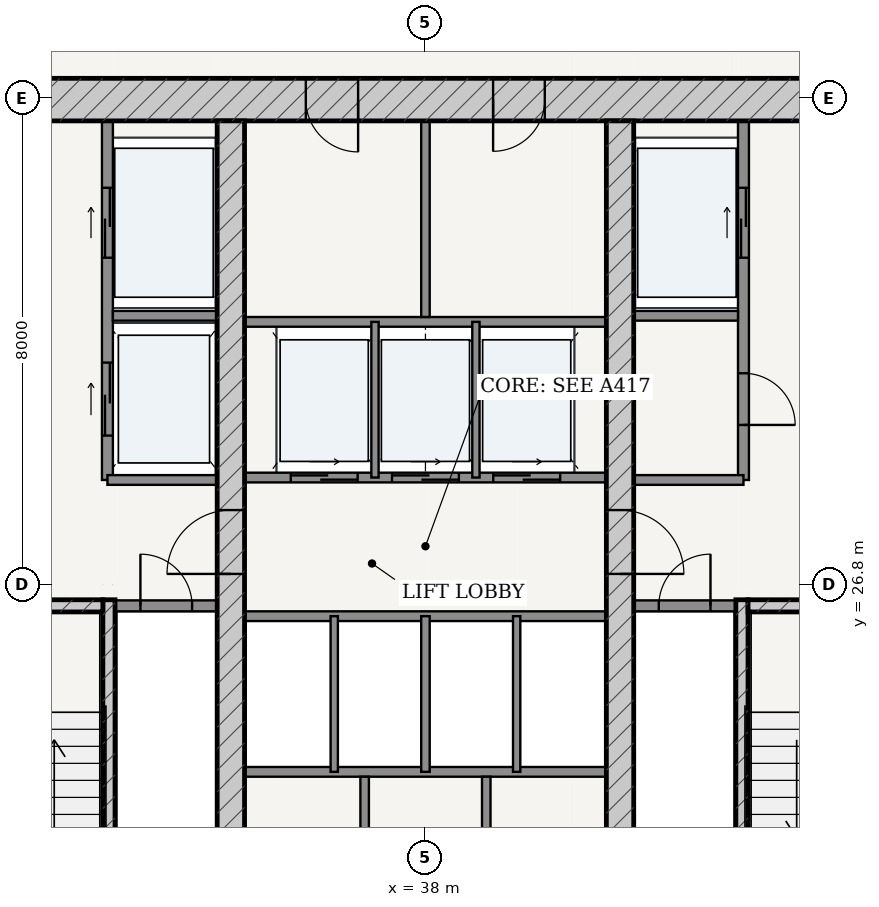
"""IFC4 building model, lengths in metres.
Left out: names, types, materials, properties, quantities, classifications, styles, units other than length and angle.
Written with IfcOpenShell. Run it as: python <this file> out.ifc"""

import sys

from ifc_helpers import new_model, si_unit, direction, frame, frame_2d, origin, place, context, subcontext, project, spatial, rectangle, extrude, source, transform, mapped, element, fill, save


model = new_model("IFC4")
c1 = context("Model", 3, precision=1e-05, world=origin(), true_north=direction((-0.2419218956, 0.970295726276)))
c2 = subcontext(c1, "Body", "Model", "MODEL_VIEW")
j1 = project(units=[si_unit("LENGTHUNIT", "METRE"), si_unit("PLANEANGLEUNIT", "RADIAN")], contexts=[c1])
p1 = place(None, origin())
s1 = spatial("IfcSite", under=j1, at=p1, CompositionType="ELEMENT")
p2 = place(p1, origin())
s2 = spatial("IfcBuilding", under=s1, at=p2, CompositionType="ELEMENT")
p3 = place(p2, frame((0.0, 0.0, 105.0)))
s3 = spatial("IfcBuildingStorey", under=s2, at=p3, CompositionType="ELEMENT", Elevation=105.0)
p4 = place(p3, frame((28.675, 34.775, 0.0), z_axis=(0.0, 0.0, 1.0), x_axis=(1.0, 0.0, 0.0)))
e1 = element("IfcWall", 1, at=p4, inside=s3, PredefinedType="SHEAR", context=c2, shape_type="SweptSolid", body=[
    extrude(rectangle(XDim=18.65, YDim=0.7, at=frame_2d((9.325, 0.0))), origin(), (0.0, 0.0, 1.0), 3.325),
])
p5 = place(p4, frame((7.357, 0.0, 0.0)))
e2 = element("IfcOpeningElement", 2, at=p5, cuts=e1, PredefinedType="OPENING", context=c2, shape_type="SweptSolid", body=[
    extrude(rectangle(XDim=0.86, YDim=2.1, at=frame_2d((0.43, 1.05))), frame((0.0, 0.36, 0.0), z_axis=(0.0, -1.0, 0.0), x_axis=(1.0, 0.0, 0.0)), (0.0, 0.0, 1.0), 0.72),
])
p6 = place(p4, frame((10.438, 0.0, 0.0)))
e3 = element("IfcOpeningElement", 3, at=p6, cuts=e1, PredefinedType="OPENING", context=c2, shape_type="SweptSolid", body=[
    extrude(rectangle(XDim=0.85, YDim=2.1, at=frame_2d((0.425, 1.05))), frame((0.0, 0.36, 0.0), z_axis=(0.0, -1.0, 0.0), x_axis=(1.0, 0.0, 0.0)), (0.0, 0.0, 1.0), 0.72),
])
p7 = place(p3, frame((32.795, 19.175, 0.0), z_axis=(0.0, 0.0, 1.0), x_axis=(0.0, 1.0, 0.0)))
e4 = element("IfcWall", 4, at=p7, inside=s3, PredefinedType="SOLIDWALL", context=c2, shape_type="SweptSolid", body=[
    extrude(rectangle(XDim=7.375, YDim=0.2, at=frame_2d((3.688, 0.0))), origin(), (0.0, 0.0, 1.0), 3.325),
])
p8 = place(p3, frame((29.375, 26.45, 0.0), z_axis=(0.0, 0.0, 1.0), x_axis=(1.0, 0.0, 0.0)))
e5 = element("IfcWall", 5, at=p8, inside=s3, PredefinedType="SOLIDWALL", context=c2, shape_type="SweptSolid", body=[
    extrude(rectangle(XDim=3.32, YDim=0.2, at=frame_2d((1.66, 0.0))), origin(), (0.0, 0.0, 1.0), 3.325),
])
p9 = place(p8, frame((1.185, 0.0, 0.0)))
e6 = element("IfcOpeningElement", 6, at=p9, cuts=e5, PredefinedType="OPENING", context=c2, shape_type="SweptSolid", body=[
    extrude(rectangle(XDim=0.95, YDim=2.15, at=frame_2d((0.475, 1.075))), frame((0.0, 0.11, 0.0), z_axis=(0.0, -1.0, 0.0), x_axis=(1.0, 0.0, 0.0)), (0.0, 0.0, 1.0), 0.22),
])
p10 = place(p3, frame((43.205, 19.175, 0.0), z_axis=(0.0, 0.0, 1.0), x_axis=(0.0, 1.0, 0.0)))
e7 = element("IfcWall", 7, at=p10, inside=s3, PredefinedType="SOLIDWALL", context=c2, shape_type="SweptSolid", body=[
    extrude(rectangle(XDim=7.375, YDim=0.2, at=frame_2d((3.688, 0.0))), origin(), (0.0, 0.0, 1.0), 3.325),
])
p11 = place(p3, frame((43.305, 26.45, 0.0), z_axis=(0.0, 0.0, 1.0), x_axis=(1.0, 0.0, 0.0)))
e8 = element("IfcWall", 8, at=p11, inside=s3, PredefinedType="SOLIDWALL", context=c2, shape_type="SweptSolid", body=[
    extrude(rectangle(XDim=3.32, YDim=0.2, at=frame_2d((1.66, 0.0))), origin(), (0.0, 0.0, 1.0), 3.325),
])
p12 = place(p11, frame((1.185, 0.0, 0.0)))
e9 = element("IfcOpeningElement", 9, at=p12, cuts=e8, PredefinedType="OPENING", context=c2, shape_type="SweptSolid", body=[
    extrude(rectangle(XDim=0.95, YDim=2.15, at=frame_2d((0.475, 1.075))), frame((0.0, 0.11, 0.0), z_axis=(0.0, -1.0, 0.0), x_axis=(1.0, 0.0, 0.0)), (0.0, 0.0, 1.0), 0.22),
])
p13 = place(p3, frame((34.8, 19.175, 0.0), z_axis=(0.0, 0.0, 1.0), x_axis=(0.0, 1.0, 0.0)))
e10 = element("IfcWall", 10, at=p13, inside=s3, PredefinedType="SHEAR", context=c2, shape_type="SweptSolid", body=[
    extrude(rectangle(XDim=15.25, YDim=0.45, at=frame_2d((7.625, 0.0))), origin(), (0.0, 0.0, 1.0), 3.325),
])
p14 = place(p13, frame((7.8, 0.0, 0.0)))
e11 = element("IfcOpeningElement", 11, at=p14, cuts=e10, PredefinedType="OPENING", context=c2, shape_type="SweptSolid", body=[
    extrude(rectangle(XDim=1.05, YDim=2.15, at=frame_2d((0.525, 1.075))), frame((0.0, 0.235, 0.0), z_axis=(0.0, -1.0, 0.0), x_axis=(1.0, 0.0, 0.0)), (0.0, 0.0, 1.0), 0.47),
])
p15 = place(p3, frame((41.2, 19.175, 0.0), z_axis=(0.0, 0.0, 1.0), x_axis=(0.0, 1.0, 0.0)))
e12 = element("IfcWall", 12, at=p15, inside=s3, PredefinedType="SHEAR", context=c2, shape_type="SweptSolid", body=[
    extrude(rectangle(XDim=15.25, YDim=0.45, at=frame_2d((7.625, 0.0))), origin(), (0.0, 0.0, 1.0), 3.325),
])
p16 = place(p15, frame((7.8, 0.0, 0.0)))
e13 = element("IfcOpeningElement", 13, at=p16, cuts=e12, PredefinedType="OPENING", context=c2, shape_type="SweptSolid", body=[
    extrude(rectangle(XDim=1.05, YDim=2.15, at=frame_2d((0.525, 1.075))), frame((0.0, 0.235, 0.0), z_axis=(0.0, -1.0, 0.0), x_axis=(1.0, 0.0, 0.0)), (0.0, 0.0, 1.0), 0.47),
])
p17 = place(p3, frame((32.9, 26.45, 0.0), z_axis=(0.0, 0.0, 1.0), x_axis=(1.0, 0.0, 0.0)))
e14 = element("IfcWall", 14, at=p17, inside=s3, PredefinedType="PARTITIONING", context=c2, shape_type="SweptSolid", body=[
    extrude(rectangle(XDim=1.675, YDim=0.18, at=frame_2d((0.837, 0.0))), origin(), (0.0, 0.0, 1.0), 3.325),
])
p18 = place(p17, frame((0.413, 0.0, 0.0)))
e15 = element("IfcOpeningElement", 15, at=p18, cuts=e14, PredefinedType="OPENING", context=c2, shape_type="SweptSolid", body=[
    extrude(rectangle(XDim=0.85, YDim=2.1, at=frame_2d((0.425, 1.05))), frame((0.0, 0.1, 0.0), z_axis=(0.0, -1.0, 0.0), x_axis=(1.0, 0.0, 0.0)), (0.0, 0.0, 1.0), 0.2),
])
p19 = place(p3, frame((41.425, 26.45, 0.0), z_axis=(0.0, 0.0, 1.0), x_axis=(1.0, 0.0, 0.0)))
e16 = element("IfcWall", 16, at=p19, inside=s3, PredefinedType="PARTITIONING", context=c2, shape_type="SweptSolid", body=[
    extrude(rectangle(XDim=1.675, YDim=0.18, at=frame_2d((0.837, 0.0))), origin(), (0.0, 0.0, 1.0), 3.325),
])
p20 = place(p19, frame((0.413, 0.0, 0.0)))
e17 = element("IfcOpeningElement", 17, at=p20, cuts=e16, PredefinedType="OPENING", context=c2, shape_type="SweptSolid", body=[
    extrude(rectangle(XDim=0.85, YDim=2.1, at=frame_2d((0.425, 1.05))), frame((0.0, 0.1, 0.0), z_axis=(0.0, -1.0, 0.0), x_axis=(1.0, 0.0, 0.0)), (0.0, 0.0, 1.0), 0.2),
])
p21 = place(p3, frame((32.77, 28.52, 0.0), z_axis=(0.0, 0.0, 1.0), x_axis=(0.0, 1.0, 0.0)))
e18 = element("IfcWall", 18, at=p21, inside=s3, PredefinedType="PARTITIONING", context=c2, shape_type="SweptSolid", body=[
    extrude(rectangle(XDim=5.905, YDim=0.18, at=frame_2d((2.953, 0.0))), origin(), (0.0, 0.0, 1.0), 3.325),
])
p22 = place(p21, frame((3.655, 0.0, 0.0)))
e19 = element("IfcOpeningElement", 19, at=p22, cuts=e18, PredefinedType="OPENING", context=c2, shape_type="SweptSolid", body=[
    extrude(rectangle(XDim=1.15, YDim=2.2, at=frame_2d((0.575, 1.1))), frame((0.0, 0.1, 0.0), z_axis=(0.0, -1.0, 0.0), x_axis=(1.0, 0.0, 0.0)), (0.0, 0.0, 1.0), 0.2),
])
p23 = place(p21, frame((0.73, 0.0, 0.0)))
e20 = element("IfcOpeningElement", 20, at=p23, cuts=e18, PredefinedType="OPENING", context=c2, shape_type="SweptSolid", body=[
    extrude(rectangle(XDim=1.2, YDim=2.25, at=frame_2d((0.6, 1.125))), frame((0.0, 0.1, 0.0), z_axis=(0.0, -1.0, 0.0), x_axis=(1.0, 0.0, 0.0)), (0.0, 0.0, 1.0), 0.2),
])
p24 = place(p3, frame((32.86, 31.22, 0.0), z_axis=(0.0, 0.0, 1.0), x_axis=(1.0, 0.0, 0.0)))
e21 = element("IfcWall", 21, at=p24, inside=s3, PredefinedType="PARTITIONING", context=c2, shape_type="SweptSolid", body=[
    extrude(rectangle(XDim=1.715, YDim=0.16, at=frame_2d((0.857, 0.0))), origin(), (0.0, 0.0, 1.0), 3.325),
])
p25 = place(p3, frame((32.77, 28.52, 0.0), z_axis=(0.0, 0.0, 1.0), x_axis=(1.0, 0.0, 0.0)))
e22 = element("IfcWall", 22, at=p25, inside=s3, PredefinedType="PARTITIONING", context=c2, shape_type="SweptSolid", body=[
    extrude(rectangle(XDim=1.805, YDim=0.16, at=frame_2d((0.902, 0.0))), origin(), (0.0, 0.0, 1.0), 3.325),
])
p26 = place(p3, frame((43.23, 28.52, 0.0), z_axis=(0.0, 0.0, 1.0), x_axis=(0.0, 1.0, 0.0)))
e23 = element("IfcWall", 23, at=p26, inside=s3, PredefinedType="PARTITIONING", context=c2, shape_type="SweptSolid", body=[
    extrude(rectangle(XDim=5.905, YDim=0.18, at=frame_2d((2.953, 0.0))), origin(), (0.0, 0.0, 1.0), 3.325),
])
p27 = place(p26, frame((0.905, 0.0, 0.0)))
e24 = element("IfcOpeningElement", 24, at=p27, cuts=e23, PredefinedType="OPENING", context=c2, shape_type="SweptSolid", body=[
    extrude(rectangle(XDim=0.85, YDim=2.1, at=frame_2d((0.425, 1.05))), frame((0.0, 0.1, 0.0), z_axis=(0.0, -1.0, 0.0), x_axis=(1.0, 0.0, 0.0)), (0.0, 0.0, 1.0), 0.2),
])
p28 = place(p26, frame((3.655, 0.0, 0.0)))
e25 = element("IfcOpeningElement", 25, at=p28, cuts=e23, PredefinedType="OPENING", context=c2, shape_type="SweptSolid", body=[
    extrude(rectangle(XDim=1.15, YDim=2.2, at=frame_2d((0.575, 1.1))), frame((0.0, 0.1, 0.0), z_axis=(0.0, -1.0, 0.0), x_axis=(1.0, 0.0, 0.0)), (0.0, 0.0, 1.0), 0.2),
])
p29 = place(p3, frame((41.425, 31.22, 0.0), z_axis=(0.0, 0.0, 1.0), x_axis=(1.0, 0.0, 0.0)))
e26 = element("IfcWall", 26, at=p29, inside=s3, PredefinedType="PARTITIONING", context=c2, shape_type="SweptSolid", body=[
    extrude(rectangle(XDim=1.715, YDim=0.16, at=frame_2d((0.857, 0.0))), origin(), (0.0, 0.0, 1.0), 3.325),
])
p30 = place(p3, frame((41.425, 28.52, 0.0), z_axis=(0.0, 0.0, 1.0), x_axis=(1.0, 0.0, 0.0)))
e27 = element("IfcWall", 27, at=p30, inside=s3, PredefinedType="PARTITIONING", context=c2, shape_type="SweptSolid", body=[
    extrude(rectangle(XDim=1.805, YDim=0.16, at=frame_2d((0.902, 0.0))), origin(), (0.0, 0.0, 1.0), 3.325),
])
p31 = place(p3, frame((35.025, 28.56, 0.0), z_axis=(0.0, 0.0, 1.0), x_axis=(1.0, 0.0, 0.0)))
e28 = element("IfcWall", 28, at=p31, inside=s3, PredefinedType="PARTITIONING", context=c2, shape_type="SweptSolid", body=[
    extrude(rectangle(XDim=5.95, YDim=0.16, at=frame_2d((2.975, 0.0))), origin(), (0.0, 0.0, 1.0), 3.325),
])
p32 = place(p31, frame((0.76, 0.0, 0.0)))
e29 = element("IfcOpeningElement", 29, at=p32, cuts=e28, PredefinedType="OPENING", context=c2, shape_type="SweptSolid", body=[
    extrude(rectangle(XDim=1.1, YDim=2.2, at=frame_2d((0.55, 1.1))), frame((0.0, 0.09, 0.0), z_axis=(0.0, -1.0, 0.0), x_axis=(1.0, 0.0, 0.0)), (0.0, 0.0, 1.0), 0.18),
])
p33 = place(p31, frame((2.425, 0.0, 0.0)))
e30 = element("IfcOpeningElement", 30, at=p33, cuts=e28, PredefinedType="OPENING", context=c2, shape_type="SweptSolid", body=[
    extrude(rectangle(XDim=1.1, YDim=2.2, at=frame_2d((0.55, 1.1))), frame((0.0, 0.09, 0.0), z_axis=(0.0, -1.0, 0.0), x_axis=(1.0, 0.0, 0.0)), (0.0, 0.0, 1.0), 0.18),
])
p34 = place(p31, frame((4.09, 0.0, 0.0)))
e31 = element("IfcOpeningElement", 31, at=p34, cuts=e28, PredefinedType="OPENING", context=c2, shape_type="SweptSolid", body=[
    extrude(rectangle(XDim=1.1, YDim=2.2, at=frame_2d((0.55, 1.1))), frame((0.0, 0.09, 0.0), z_axis=(0.0, -1.0, 0.0), x_axis=(1.0, 0.0, 0.0)), (0.0, 0.0, 1.0), 0.18),
])
p35 = place(p3, frame((35.025, 31.12, 0.0), z_axis=(0.0, 0.0, 1.0), x_axis=(1.0, 0.0, 0.0)))
e32 = element("IfcWall", 32, at=p35, inside=s3, PredefinedType="PARTITIONING", context=c2, shape_type="SweptSolid", body=[
    extrude(rectangle(XDim=5.95, YDim=0.16, at=frame_2d((2.975, 0.0))), origin(), (0.0, 0.0, 1.0), 3.325),
])
for number, where, z_axis, x_axis in (
    (33, (37.17, 28.56, 0.0), (0.0, 0.0, 1.0), (0.0, 1.0, 0.0)),
    (34, (38.83, 28.56, 0.0), (0.0, 0.0, 1.0), (0.0, 1.0, 0.0)),
):
    element("IfcWall", number, at=place(p3, frame(where, z_axis=z_axis, x_axis=x_axis)), inside=s3, PredefinedType="PARTITIONING", context=c2, shape_type="SweptSolid", body=[
        extrude(rectangle(XDim=2.56, YDim=0.12, at=frame_2d((1.28, 0.0))), origin(), (0.0, 0.0, 1.0), 3.325),
    ])
p36 = place(p3, frame((38.0, 31.2, 0.0), z_axis=(0.0, 0.0, 1.0), x_axis=(0.0, 1.0, 0.0)))
e35 = element("IfcWall", 35, at=p36, inside=s3, PredefinedType="PARTITIONING", context=c2, shape_type="SweptSolid", body=[
    extrude(rectangle(XDim=3.225, YDim=0.14, at=frame_2d((1.613, 0.0))), origin(), (0.0, 0.0, 1.0), 3.325),
])
for number, where, z_axis, x_axis in (
    (36, (35.025, 26.28, 0.0), (0.0, 0.0, 1.0), (1.0, 0.0, 0.0)),
    (37, (35.025, 23.72, 0.0), (0.0, 0.0, 1.0), (1.0, 0.0, 0.0)),
):
    element("IfcWall", number, at=place(p3, frame(where, z_axis=z_axis, x_axis=x_axis)), inside=s3, PredefinedType="PARTITIONING", context=c2, shape_type="SweptSolid", body=[
        extrude(rectangle(XDim=5.95, YDim=0.16, at=frame_2d((2.975, 0.0))), origin(), (0.0, 0.0, 1.0), 3.325),
    ])
p37 = place(p3, frame((36.5, 23.72, 0.0), z_axis=(0.0, 0.0, 1.0), x_axis=(0.0, 1.0, 0.0)))
e38 = element("IfcWall", 38, at=p37, inside=s3, PredefinedType="PARTITIONING", context=c2, shape_type="SweptSolid", body=[
    extrude(rectangle(XDim=2.56, YDim=0.12, at=frame_2d((1.28, 0.0))), origin(), (0.0, 0.0, 1.0), 3.325),
])
p38 = place(p3, frame((38.0, 23.72, 0.0), z_axis=(0.0, 0.0, 1.0), x_axis=(0.0, 1.0, 0.0)))
e39 = element("IfcWall", 39, at=p38, inside=s3, PredefinedType="PARTITIONING", context=c2, shape_type="SweptSolid", body=[
    extrude(rectangle(XDim=2.56, YDim=0.14, at=frame_2d((1.28, 0.0))), origin(), (0.0, 0.0, 1.0), 3.325),
])
p39 = place(p3, frame((39.5, 23.72, 0.0), z_axis=(0.0, 0.0, 1.0), x_axis=(0.0, 1.0, 0.0)))
e40 = element("IfcWall", 40, at=p39, inside=s3, PredefinedType="PARTITIONING", context=c2, shape_type="SweptSolid", body=[
    extrude(rectangle(XDim=2.56, YDim=0.12, at=frame_2d((1.28, 0.0))), origin(), (0.0, 0.0, 1.0), 3.325),
])
p40 = place(p3, frame((37.0, 19.175, 0.0), z_axis=(0.0, 0.0, 1.0), x_axis=(0.0, 1.0, 0.0)))
e41 = element("IfcWall", 41, at=p40, inside=s3, PredefinedType="PARTITIONING", context=c2, shape_type="SweptSolid", body=[
    extrude(rectangle(XDim=4.465, YDim=0.14, at=frame_2d((2.232, 0.0))), origin(), (0.0, 0.0, 1.0), 3.325),
])
p41 = place(p40, frame((1.808, 0.0, 0.0)))
e42 = element("IfcOpeningElement", 42, at=p41, cuts=e41, PredefinedType="OPENING", context=c2, shape_type="SweptSolid", body=[
    extrude(rectangle(XDim=0.85, YDim=2.1, at=frame_2d((0.425, 1.05))), frame((0.0, 0.08, 0.0), z_axis=(0.0, -1.0, 0.0), x_axis=(1.0, 0.0, 0.0)), (0.0, 0.0, 1.0), 0.16),
])
p42 = place(p3, frame((39.0, 19.175, 0.0), z_axis=(0.0, 0.0, 1.0), x_axis=(0.0, 1.0, 0.0)))
e43 = element("IfcWall", 43, at=p42, inside=s3, PredefinedType="PARTITIONING", context=c2, shape_type="SweptSolid", body=[
    extrude(rectangle(XDim=4.465, YDim=0.14, at=frame_2d((2.232, 0.0))), origin(), (0.0, 0.0, 1.0), 3.325),
])
p43 = place(p42, frame((1.808, 0.0, 0.0)))
e44 = element("IfcOpeningElement", 44, at=p43, cuts=e43, PredefinedType="OPENING", context=c2, shape_type="SweptSolid", body=[
    extrude(rectangle(XDim=0.85, YDim=2.1, at=frame_2d((0.425, 1.05))), frame((0.0, 0.08, 0.0), z_axis=(0.0, -1.0, 0.0), x_axis=(1.0, 0.0, 0.0)), (0.0, 0.0, 1.0), 0.16),
])
m1 = source(origin(), c2, "Body", "SweptSolid", [
    extrude(rectangle(XDim=1.05, YDim=2.15, at=frame_2d((0.525, 1.075))), frame((0.0, 0.025, 0.0), z_axis=(0.0, -1.0, 0.0), x_axis=(1.0, 0.0, 0.0)), (0.0, 0.0, 1.0), 0.05),
])
p44 = place(p14, origin())
e45 = element("IfcDoor", 45, at=p44, inside=s3, OperationType="SINGLE_SWING_LEFT", PredefinedType="DOOR", context=c2, shape_type="MappedRepresentation", body=[
    mapped(m1, transform((0.0, 0.0, 0.0), scale=1.0)),
])
fill(e11, e45)
p45 = place(p16, frame((1.05, 0.0, 0.0), z_axis=(0.0, 0.0, 1.0), x_axis=(-1.0, 0.0, 0.0)))
e46 = element("IfcDoor", 46, at=p45, inside=s3, OperationType="SINGLE_SWING_RIGHT", PredefinedType="DOOR", context=c2, shape_type="MappedRepresentation", body=[
    mapped(m1, transform((0.0, 0.0, 0.0), scale=1.0)),
])
fill(e13, e46)
m2 = source(origin(), c2, "Body", "SweptSolid", [
    extrude(rectangle(XDim=0.85, YDim=2.1, at=frame_2d((0.425, 1.05))), frame((0.0, 0.025, 0.0), z_axis=(0.0, -1.0, 0.0), x_axis=(1.0, 0.0, 0.0)), (0.0, 0.0, 1.0), 0.05),
])
p46 = place(p18, origin())
e47 = element("IfcDoor", 47, at=p46, inside=s3, OperationType="SINGLE_SWING_LEFT", PredefinedType="DOOR", context=c2, shape_type="MappedRepresentation", body=[
    mapped(m2, transform((0.0, 0.0, 0.0), scale=1.0)),
])
fill(e15, e47)
p47 = place(p20, origin())
e48 = element("IfcDoor", 48, at=p47, inside=s3, OperationType="SINGLE_SWING_RIGHT", PredefinedType="DOOR", context=c2, shape_type="MappedRepresentation", body=[
    mapped(m2, transform((0.0, 0.0, 0.0), scale=1.0)),
])
fill(e17, e48)
p48 = place(p27, frame((0.85, 0.0, 0.0), z_axis=(0.0, 0.0, 1.0), x_axis=(-1.0, 0.0, 0.0)))
e49 = element("IfcDoor", 49, at=p48, inside=s3, OperationType="SINGLE_SWING_RIGHT", PredefinedType="DOOR", context=c2, shape_type="MappedRepresentation", body=[
    mapped(m2, transform((0.0, 0.0, 0.0), scale=1.0)),
])
fill(e24, e49)
m3 = source(origin(), c2, "Body", "SweptSolid", [
    extrude(rectangle(XDim=0.86, YDim=2.1, at=frame_2d((0.43, 1.05))), frame((0.0, 0.025, 0.0), z_axis=(0.0, -1.0, 0.0), x_axis=(1.0, 0.0, 0.0)), (0.0, 0.0, 1.0), 0.05),
])
p49 = place(p5, frame((0.86, 0.0, 0.0), z_axis=(0.0, 0.0, 1.0), x_axis=(-1.0, 0.0, 0.0)))
e50 = element("IfcDoor", 50, at=p49, inside=s3, OperationType="SINGLE_SWING_LEFT", PredefinedType="DOOR", context=c2, shape_type="MappedRepresentation", body=[
    mapped(m3, transform((0.0, 0.0, 0.0), scale=1.0)),
])
fill(e2, e50)
p50 = place(p6, frame((0.85, 0.0, 0.0), z_axis=(0.0, 0.0, 1.0), x_axis=(-1.0, 0.0, 0.0)))
e51 = element("IfcDoor", 51, at=p50, inside=s3, OperationType="SINGLE_SWING_RIGHT", PredefinedType="DOOR", context=c2, shape_type="MappedRepresentation", body=[
    mapped(m2, transform((0.0, 0.0, 0.0), scale=1.0)),
])
fill(e3, e51)
m4 = source(origin(), c2, "Body", "SweptSolid", [
    extrude(rectangle(XDim=1.15, YDim=2.2, at=frame_2d((0.575, 1.1))), frame((0.0, 0.025, 0.0), z_axis=(0.0, -1.0, 0.0), x_axis=(1.0, 0.0, 0.0)), (0.0, 0.0, 1.0), 0.05),
])
p51 = place(p22, origin())
e52 = element("IfcDoor", 52, at=p51, inside=s3, OperationType="DOUBLE_DOOR_SLIDING", PredefinedType="DOOR", context=c2, shape_type="MappedRepresentation", body=[
    mapped(m4, transform((0.0, 0.0, 0.0), scale=1.0)),
])
fill(e19, e52)
p52 = place(p28, origin())
e53 = element("IfcDoor", 53, at=p52, inside=s3, OperationType="DOUBLE_DOOR_SLIDING", PredefinedType="DOOR", context=c2, shape_type="MappedRepresentation", body=[
    mapped(m4, transform((0.0, 0.0, 0.0), scale=1.0)),
])
fill(e25, e53)
m5 = source(origin(), c2, "Body", "SweptSolid", [
    extrude(rectangle(XDim=1.2, YDim=2.25, at=frame_2d((0.6, 1.125))), frame((0.0, 0.025, 0.0), z_axis=(0.0, -1.0, 0.0), x_axis=(1.0, 0.0, 0.0)), (0.0, 0.0, 1.0), 0.05),
])
p53 = place(p23, origin())
e54 = element("IfcDoor", 54, at=p53, inside=s3, OperationType="DOUBLE_DOOR_SLIDING", PredefinedType="DOOR", context=c2, shape_type="MappedRepresentation", body=[
    mapped(m5, transform((0.0, 0.0, 0.0), scale=1.0)),
])
fill(e20, e54)
m6 = source(origin(), c2, "Body", "SweptSolid", [
    extrude(rectangle(XDim=1.1, YDim=2.2, at=frame_2d((0.55, 1.1))), frame((0.0, 0.025, 0.0), z_axis=(0.0, -1.0, 0.0), x_axis=(1.0, 0.0, 0.0)), (0.0, 0.0, 1.0), 0.05),
])
p54 = place(p32, origin())
e55 = element("IfcDoor", 55, at=p54, inside=s3, OperationType="DOUBLE_DOOR_SLIDING", PredefinedType="DOOR", context=c2, shape_type="MappedRepresentation", body=[
    mapped(m6, transform((0.0, 0.0, 0.0), scale=1.0)),
])
fill(e29, e55)
p55 = place(p33, origin())
e56 = element("IfcDoor", 56, at=p55, inside=s3, OperationType="DOUBLE_DOOR_SLIDING", PredefinedType="DOOR", context=c2, shape_type="MappedRepresentation", body=[
    mapped(m6, transform((0.0, 0.0, 0.0), scale=1.0)),
])
fill(e30, e56)
p56 = place(p34, origin())
e57 = element("IfcDoor", 57, at=p56, inside=s3, OperationType="DOUBLE_DOOR_SLIDING", PredefinedType="DOOR", context=c2, shape_type="MappedRepresentation", body=[
    mapped(m6, transform((0.0, 0.0, 0.0), scale=1.0)),
])
fill(e31, e57)
save(model, sys.argv[1])
